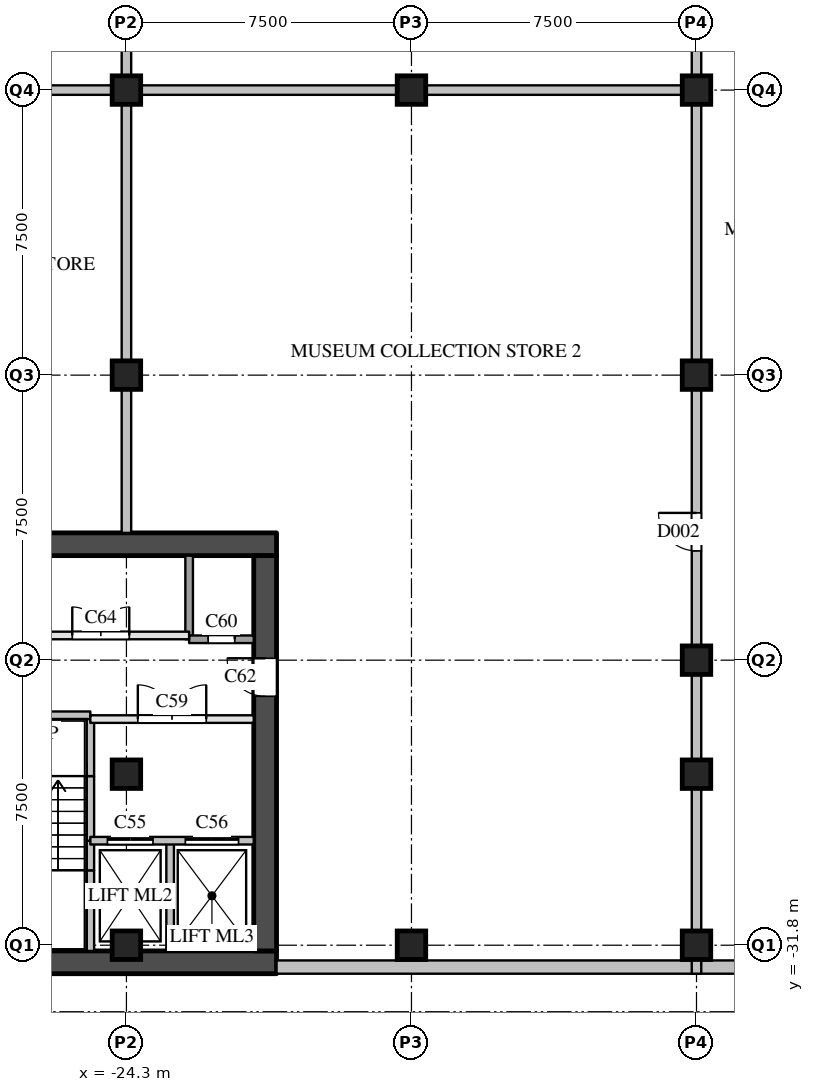
"""IFC4 building model, lengths in metres.
Left out: names, types, materials, properties, quantities, classifications, styles, units other than length and angle.
Written with IfcOpenShell. Run it as: python <this file> out.ifc"""

import sys

from ifc_helpers import new_model, si_unit, direction, frame, frame_2d, origin, origin_2d, place, context, subcontext, project, spatial, rectangle, extrude, element, fill, save


model = new_model("IFC4")
c1 = context("Model", 3, precision=1e-05, world=origin(), true_north=direction((0.0, 1.0)))
c2 = subcontext(c1, "Body", "Model", "MODEL_VIEW")
j1 = project(units=[si_unit("LENGTHUNIT", "METRE"), si_unit("PLANEANGLEUNIT", "RADIAN")], contexts=[c1])
p1 = place(None, origin())
s1 = spatial("IfcSite", under=j1, at=p1, CompositionType="ELEMENT")
p2 = place(p1, origin())
s2 = spatial("IfcBuilding", under=s1, at=p2, CompositionType="ELEMENT")
p3 = place(p2, frame((0.0, 0.0, -6.0)))
s3 = spatial("IfcBuildingStorey", under=s2, at=p3, CompositionType="ELEMENT", Elevation=-6.0)
p4 = place(p3, frame((1.75, -32.375, 0.0), z_axis=(0.0, 0.0, 1.0), x_axis=(-1.0, 0.0, 0.0)))
e1 = element("IfcWall", 1, at=p4, inside=s3, PredefinedType="SOLIDWALL", context=c2, shape_type="SweptSolid", body=[
    extrude(rectangle(XDim=22.1, YDim=0.35, at=frame_2d((11.05, 0.0))), origin(), (0.0, 0.0, 1.0), 5.59),
])
for number, where, z_axis, x_axis in (
    (2, (-24.3, -31.8, 0.0), (0.0, 0.0, 1.0), (1.0, 0.0, 0.0)),
    (3, (-24.3, -16.8, 0.0), (0.0, 0.0, 1.0), (1.0, 0.0, 0.0)),
    (4, (-24.3, -9.3, 0.0), (0.0, 0.0, 1.0), (1.0, 0.0, 0.0)),
    (5, (-16.8, -31.8, 0.0), (0.0, 0.0, 1.0), (1.0, 0.0, 0.0)),
    (6, (-16.8, -9.3, 0.0), (0.0, 0.0, 1.0), (1.0, 0.0, 0.0)),
    (7, (-9.3, -31.8, 0.0), (0.0, 0.0, 1.0), (1.0, 0.0, 0.0)),
    (8, (-9.3, -24.3, 0.0), (0.0, 0.0, 1.0), (1.0, 0.0, 0.0)),
    (9, (-9.3, -16.8, 0.0), (0.0, 0.0, 1.0), (1.0, 0.0, 0.0)),
    (10, (-9.3, -9.3, 0.0), (0.0, 0.0, 1.0), (1.0, 0.0, 0.0)),
    (11, (-24.3, -27.3, 0.0), (0.0, 0.0, 1.0), (1.0, 0.0, 0.0)),
    (12, (-9.3, -27.3, 0.0), (0.0, 0.0, 1.0), (1.0, 0.0, 0.0)),
):
    element("IfcColumn", number, at=place(p3, frame(where, z_axis=z_axis, x_axis=x_axis)), inside=s3, PredefinedType="COLUMN", context=c2, shape_type="SweptSolid", body=[
        extrude(rectangle(XDim=0.75, YDim=0.75, at=origin_2d()), origin(), (0.0, 0.0, 1.0), 6.0),
    ])
for number, where, z_axis, x_axis in (
    (13, (-32.55, -32.25, 0.0), (0.0, 0.0, 1.0), (1.0, 0.0, 0.0)),
    (14, (-32.55, -21.25, 0.0), (0.0, 0.0, 1.0), (1.0, 0.0, 0.0)),
):
    element("IfcWall", number, at=place(p3, frame(where, z_axis=z_axis, x_axis=x_axis)), inside=s3, PredefinedType="SHEAR", context=c2, shape_type="SweptSolid", body=[
        extrude(rectangle(XDim=12.2, YDim=0.6, at=frame_2d((6.1, 0.0))), origin(), (0.0, 0.0, 1.0), 5.59),
    ])
p5 = place(p3, frame((-20.65, -31.95, 0.0), z_axis=(0.0, 0.0, 1.0), x_axis=(0.0, 1.0, 0.0)))
e15 = element("IfcWall", 15, at=p5, inside=s3, PredefinedType="SHEAR", context=c2, shape_type="SweptSolid", body=[
    extrude(rectangle(XDim=10.4, YDim=0.6, at=frame_2d((5.2, 0.0))), origin(), (0.0, 0.0, 1.0), 5.59),
])
p6 = place(p5, frame((6.7, 0.0, 0.0)))
e16 = element("IfcOpeningElement", 16, at=p6, cuts=e15, PredefinedType="OPENING", context=c2, shape_type="SweptSolid", body=[
    extrude(rectangle(XDim=1.0, YDim=2.1, at=frame_2d((0.5, 1.05))), frame((0.0, 0.31, 0.0), z_axis=(0.0, -1.0, 0.0), x_axis=(1.0, 0.0, 0.0)), (0.0, 0.0, 1.0), 0.62),
])
p7 = place(p3, frame((-25.25, -31.95, 0.0), z_axis=(0.0, 0.0, 1.0), x_axis=(0.0, 1.0, 0.0)))
e17 = element("IfcWall", 17, at=p7, inside=s3, PredefinedType="SOLIDWALL", context=c2, shape_type="SweptSolid", body=[
    extrude(rectangle(XDim=2.12, YDim=0.2, at=frame_2d((1.06, 0.0))), origin(), (0.0, 0.0, 1.0), 5.59),
])
p8 = place(p3, frame((-25.25, -29.83, 0.0), z_axis=(0.0, 0.0, 1.0), x_axis=(0.0, 1.0, 0.0)))
e18 = element("IfcWall", 18, at=p8, inside=s3, PredefinedType="SOLIDWALL", context=c2, shape_type="SweptSolid", body=[
    extrude(rectangle(XDim=0.78, YDim=0.2, at=frame_2d((0.39, 0.0))), origin(), (0.0, 0.0, 1.0), 5.59),
])
p9 = place(p3, frame((-25.25, -29.05, 0.0), z_axis=(0.0, 0.0, 1.0), x_axis=(0.0, 1.0, 0.0)))
e19 = element("IfcWall", 19, at=p9, inside=s3, PredefinedType="SOLIDWALL", context=c2, shape_type="SweptSolid", body=[
    extrude(rectangle(XDim=1.7, YDim=0.2, at=frame_2d((0.85, 0.0))), origin(), (0.0, 0.0, 1.0), 5.59),
])
p10 = place(p3, frame((-25.25, -27.35, 0.0), z_axis=(0.0, 0.0, 1.0), x_axis=(0.0, 1.0, 0.0)))
e20 = element("IfcWall", 20, at=p10, inside=s3, PredefinedType="SOLIDWALL", context=c2, shape_type="SweptSolid", body=[
    extrude(rectangle(XDim=1.6, YDim=0.2, at=frame_2d((0.8, 0.0))), origin(), (0.0, 0.0, 1.0), 5.59),
])
p11 = place(p3, frame((-23.15, -31.95, 0.0), z_axis=(0.0, 0.0, 1.0), x_axis=(0.0, 1.0, 0.0)))
e21 = element("IfcWall", 21, at=p11, inside=s3, PredefinedType="SOLIDWALL", context=c2, shape_type="SweptSolid", body=[
    extrude(rectangle(XDim=2.9, YDim=0.2, at=frame_2d((1.45, 0.0))), origin(), (0.0, 0.0, 1.0), 5.59),
])
p12 = place(p3, frame((-22.65, -23.75, 0.0), z_axis=(0.0, 0.0, 1.0), x_axis=(0.0, 1.0, 0.0)))
e22 = element("IfcWall", 22, at=p12, inside=s3, PredefinedType="SOLIDWALL", context=c2, shape_type="SweptSolid", body=[
    extrude(rectangle(XDim=2.2, YDim=0.2, at=frame_2d((1.1, 0.0))), origin(), (0.0, 0.0, 1.0), 5.59),
])
p13 = place(p3, frame((-25.25, -29.05, 0.0), z_axis=(0.0, 0.0, 1.0), x_axis=(1.0, 0.0, 0.0)))
e23 = element("IfcWall", 23, at=p13, inside=s3, PredefinedType="SOLIDWALL", context=c2, shape_type="SweptSolid", body=[
    extrude(rectangle(XDim=4.3, YDim=0.2, at=frame_2d((2.15, 0.0))), origin(), (0.0, 0.0, 1.0), 5.59),
])
p14 = place(p13, frame((0.45, 0.0, 0.0)))
e24 = element("IfcOpeningElement", 24, at=p14, cuts=e23, PredefinedType="OPENING", context=c2, shape_type="SweptSolid", body=[
    extrude(rectangle(XDim=1.2, YDim=2.1, at=frame_2d((0.6, 1.05))), frame((0.0, 0.11, 0.0), z_axis=(0.0, -1.0, 0.0), x_axis=(1.0, 0.0, 0.0)), (0.0, 0.0, 1.0), 0.22),
])
p15 = place(p13, frame((2.5, 0.0, 0.0)))
e25 = element("IfcOpeningElement", 25, at=p15, cuts=e23, PredefinedType="OPENING", context=c2, shape_type="SweptSolid", body=[
    extrude(rectangle(XDim=1.4, YDim=2.1, at=frame_2d((0.7, 1.05))), frame((0.0, 0.11, 0.0), z_axis=(0.0, -1.0, 0.0), x_axis=(1.0, 0.0, 0.0)), (0.0, 0.0, 1.0), 0.22),
])
p16 = place(p3, frame((-25.25, -25.85, 0.0), z_axis=(0.0, 0.0, 1.0), x_axis=(1.0, 0.0, 0.0)))
e26 = element("IfcWall", 26, at=p16, inside=s3, PredefinedType="PARTITIONING", context=c2, shape_type="SweptSolid", body=[
    extrude(rectangle(XDim=4.3, YDim=0.2, at=frame_2d((2.15, 0.0))), origin(), (0.0, 0.0, 1.0), 5.59),
])
p17 = place(p16, frame((1.25, 0.0, 0.0)))
e27 = element("IfcOpeningElement", 27, at=p17, cuts=e26, PredefinedType="OPENING", context=c2, shape_type="SweptSolid", body=[
    extrude(rectangle(XDim=1.8, YDim=2.1, at=frame_2d((0.9, 1.05))), frame((0.0, 0.11, 0.0), z_axis=(0.0, -1.0, 0.0), x_axis=(1.0, 0.0, 0.0)), (0.0, 0.0, 1.0), 0.22),
])
p18 = place(p3, frame((-28.5, -25.75, 0.0), z_axis=(0.0, 0.0, 1.0), x_axis=(1.0, 0.0, 0.0)))
e28 = element("IfcWall", 28, at=p18, inside=s3, PredefinedType="SOLIDWALL", context=c2, shape_type="SweptSolid", body=[
    extrude(rectangle(XDim=3.25, YDim=0.2, at=frame_2d((1.625, 0.0))), origin(), (0.0, 0.0, 1.0), 5.59),
])
p19 = place(p18, frame((1.025, 0.0, 0.0)))
e29 = element("IfcOpeningElement", 29, at=p19, cuts=e28, PredefinedType="OPENING", context=c2, shape_type="SweptSolid", body=[
    extrude(rectangle(XDim=1.1, YDim=2.1, at=frame_2d((0.55, 1.05))), frame((0.0, 0.11, 0.0), z_axis=(0.0, -1.0, 0.0), x_axis=(1.0, 0.0, 0.0)), (0.0, 0.0, 1.0), 0.22),
])
p20 = place(p3, frame((-31.95, -23.65, 0.0), z_axis=(0.0, 0.0, 1.0), x_axis=(1.0, 0.0, 0.0)))
e30 = element("IfcWall", 30, at=p20, inside=s3, PredefinedType="PARTITIONING", context=c2, shape_type="SweptSolid", body=[
    extrude(rectangle(XDim=9.3, YDim=0.2, at=frame_2d((4.65, 0.0))), origin(), (0.0, 0.0, 1.0), 5.59),
])
p21 = place(p20, frame((1.575, 0.0, 0.0)))
e31 = element("IfcOpeningElement", 31, at=p21, cuts=e30, PredefinedType="OPENING", context=c2, shape_type="SweptSolid", body=[
    extrude(rectangle(XDim=1.5, YDim=2.1, at=frame_2d((0.75, 1.05))), frame((0.0, 0.11, 0.0), z_axis=(0.0, -1.0, 0.0), x_axis=(1.0, 0.0, 0.0)), (0.0, 0.0, 1.0), 0.22),
])
p22 = place(p20, frame((6.225, 0.0, 0.0)))
e32 = element("IfcOpeningElement", 32, at=p22, cuts=e30, PredefinedType="OPENING", context=c2, shape_type="SweptSolid", body=[
    extrude(rectangle(XDim=1.5, YDim=2.1, at=frame_2d((0.75, 1.05))), frame((0.0, 0.11, 0.0), z_axis=(0.0, -1.0, 0.0), x_axis=(1.0, 0.0, 0.0)), (0.0, 0.0, 1.0), 0.22),
])
p23 = place(p3, frame((-22.65, -23.75, 0.0), z_axis=(0.0, 0.0, 1.0), x_axis=(1.0, 0.0, 0.0)))
e33 = element("IfcWall", 33, at=p23, inside=s3, PredefinedType="SOLIDWALL", context=c2, shape_type="SweptSolid", body=[
    extrude(rectangle(XDim=1.7, YDim=0.2, at=frame_2d((0.85, 0.0))), origin(), (0.0, 0.0, 1.0), 5.59),
])
p24 = place(p23, frame((0.5, 0.0, 0.0)))
e34 = element("IfcOpeningElement", 34, at=p24, cuts=e33, PredefinedType="OPENING", context=c2, shape_type="SweptSolid", body=[
    extrude(rectangle(XDim=0.7, YDim=2.1, at=frame_2d((0.35, 1.05))), frame((0.0, 0.11, 0.0), z_axis=(0.0, -1.0, 0.0), x_axis=(1.0, 0.0, 0.0)), (0.0, 0.0, 1.0), 0.22),
])
p25 = place(p3, frame((-32.55, -9.3, 0.0), z_axis=(0.0, 0.0, 1.0), x_axis=(1.0, 0.0, 0.0)))
e35 = element("IfcWall", 35, at=p25, inside=s3, PredefinedType="PARTITIONING", context=c2, shape_type="SweptSolid", body=[
    extrude(rectangle(XDim=23.25, YDim=0.25, at=frame_2d((11.625, 0.0))), origin(), (0.0, 0.0, 1.0), 4.79),
])
p26 = place(p25, frame((3.625, 0.0, 0.0)))
e36 = element("IfcOpeningElement", 36, at=p26, cuts=e35, PredefinedType="OPENING", context=c2, shape_type="SweptSolid", body=[
    extrude(rectangle(XDim=1.0, YDim=2.1, at=frame_2d((0.5, 1.05))), frame((0.0, 0.135, 0.0), z_axis=(0.0, -1.0, 0.0), x_axis=(1.0, 0.0, 0.0)), (0.0, 0.0, 1.0), 0.27),
])
p27 = place(p3, frame((-24.3, -20.95, 0.0), z_axis=(0.0, 0.0, 1.0), x_axis=(0.0, 1.0, 0.0)))
e37 = element("IfcWall", 37, at=p27, inside=s3, PredefinedType="PARTITIONING", context=c2, shape_type="SweptSolid", body=[
    extrude(rectangle(XDim=32.95, YDim=0.25, at=frame_2d((16.475, 0.0))), origin(), (0.0, 0.0, 1.0), 4.79),
])
p28 = place(p27, frame((21.8, 0.0, 0.0)))
e38 = element("IfcOpeningElement", 38, at=p28, cuts=e37, PredefinedType="OPENING", context=c2, shape_type="SweptSolid", body=[
    extrude(rectangle(XDim=1.0, YDim=2.1, at=frame_2d((0.5, 1.05))), frame((0.0, 0.135, 0.0), z_axis=(0.0, -1.0, 0.0), x_axis=(1.0, 0.0, 0.0)), (0.0, 0.0, 1.0), 0.27),
])
p29 = place(p3, frame((-9.3, -32.55, 0.0), z_axis=(0.0, 0.0, 1.0), x_axis=(0.0, 1.0, 0.0)))
e39 = element("IfcWall", 39, at=p29, inside=s3, PredefinedType="PARTITIONING", context=c2, shape_type="SweptSolid", body=[
    extrude(rectangle(XDim=28.625, YDim=0.25, at=frame_2d((14.312, 0.0))), origin(), (0.0, 0.0, 1.0), 4.79),
])
p30 = place(p29, frame((11.125, 0.0, 0.0)))
e40 = element("IfcOpeningElement", 40, at=p30, cuts=e39, PredefinedType="OPENING", context=c2, shape_type="SweptSolid", body=[
    extrude(rectangle(XDim=1.0, YDim=2.1, at=frame_2d((0.5, 1.05))), frame((0.0, 0.135, 0.0), z_axis=(0.0, -1.0, 0.0), x_axis=(1.0, 0.0, 0.0)), (0.0, 0.0, 1.0), 0.27),
])
p31 = place(p14, origin())
e41 = element("IfcDoor", 41, at=p31, inside=s3, OperationType="SLIDING_TO_LEFT", PredefinedType="DOOR", context=c2, shape_type="SweptSolid", body=[
    extrude(rectangle(XDim=1.2, YDim=2.1, at=frame_2d((0.6, 1.05))), frame((0.0, 0.025, 0.0), z_axis=(0.0, -1.0, 0.0), x_axis=(1.0, 0.0, 0.0)), (0.0, 0.0, 1.0), 0.05),
])
fill(e24, e41)
p32 = place(p15, origin())
e42 = element("IfcDoor", 42, at=p32, inside=s3, OperationType="SLIDING_TO_LEFT", PredefinedType="DOOR", context=c2, shape_type="SweptSolid", body=[
    extrude(rectangle(XDim=1.4, YDim=2.1, at=frame_2d((0.7, 1.05))), frame((0.0, 0.025, 0.0), z_axis=(0.0, -1.0, 0.0), x_axis=(1.0, 0.0, 0.0)), (0.0, 0.0, 1.0), 0.05),
])
fill(e25, e42)
p33 = place(p17, origin())
e43 = element("IfcDoor", 43, at=p33, inside=s3, OperationType="DOUBLE_DOOR_SINGLE_SWING", PredefinedType="DOOR", context=c2, shape_type="SweptSolid", body=[
    extrude(rectangle(XDim=1.8, YDim=2.1, at=frame_2d((0.9, 1.05))), frame((0.0, 0.025, 0.0), z_axis=(0.0, -1.0, 0.0), x_axis=(1.0, 0.0, 0.0)), (0.0, 0.0, 1.0), 0.05),
])
fill(e27, e43)
p34 = place(p24, origin())
e44 = element("IfcDoor", 44, at=p34, inside=s3, OperationType="SINGLE_SWING_RIGHT", PredefinedType="DOOR", context=c2, shape_type="SweptSolid", body=[
    extrude(rectangle(XDim=0.7, YDim=2.1, at=frame_2d((0.35, 1.05))), frame((0.0, 0.025, 0.0), z_axis=(0.0, -1.0, 0.0), x_axis=(1.0, 0.0, 0.0)), (0.0, 0.0, 1.0), 0.05),
])
fill(e34, e44)
p35 = place(p6, origin())
e45 = element("IfcDoor", 45, at=p35, inside=s3, OperationType="SINGLE_SWING_RIGHT", PredefinedType="DOOR", context=c2, shape_type="SweptSolid", body=[
    extrude(rectangle(XDim=1.0, YDim=2.1, at=frame_2d((0.5, 1.05))), frame((0.0, 0.025, 0.0), z_axis=(0.0, -1.0, 0.0), x_axis=(1.0, 0.0, 0.0)), (0.0, 0.0, 1.0), 0.05),
])
fill(e16, e45)
p36 = place(p22, origin())
e46 = element("IfcDoor", 46, at=p36, inside=s3, OperationType="DOUBLE_DOOR_SINGLE_SWING", PredefinedType="DOOR", context=c2, shape_type="SweptSolid", body=[
    extrude(rectangle(XDim=1.5, YDim=2.1, at=frame_2d((0.75, 1.05))), frame((0.0, 0.025, 0.0), z_axis=(0.0, -1.0, 0.0), x_axis=(1.0, 0.0, 0.0)), (0.0, 0.0, 1.0), 0.05),
])
fill(e32, e46)
p37 = place(p30, origin())
e47 = element("IfcDoor", 47, at=p37, inside=s3, OperationType="SINGLE_SWING_RIGHT", PredefinedType="DOOR", context=c2, shape_type="SweptSolid", body=[
    extrude(rectangle(XDim=1.0, YDim=2.1, at=frame_2d((0.5, 1.05))), frame((0.0, 0.025, 0.0), z_axis=(0.0, -1.0, 0.0), x_axis=(1.0, 0.0, 0.0)), (0.0, 0.0, 1.0), 0.05),
])
fill(e40, e47)
save(model, sys.argv[1])
